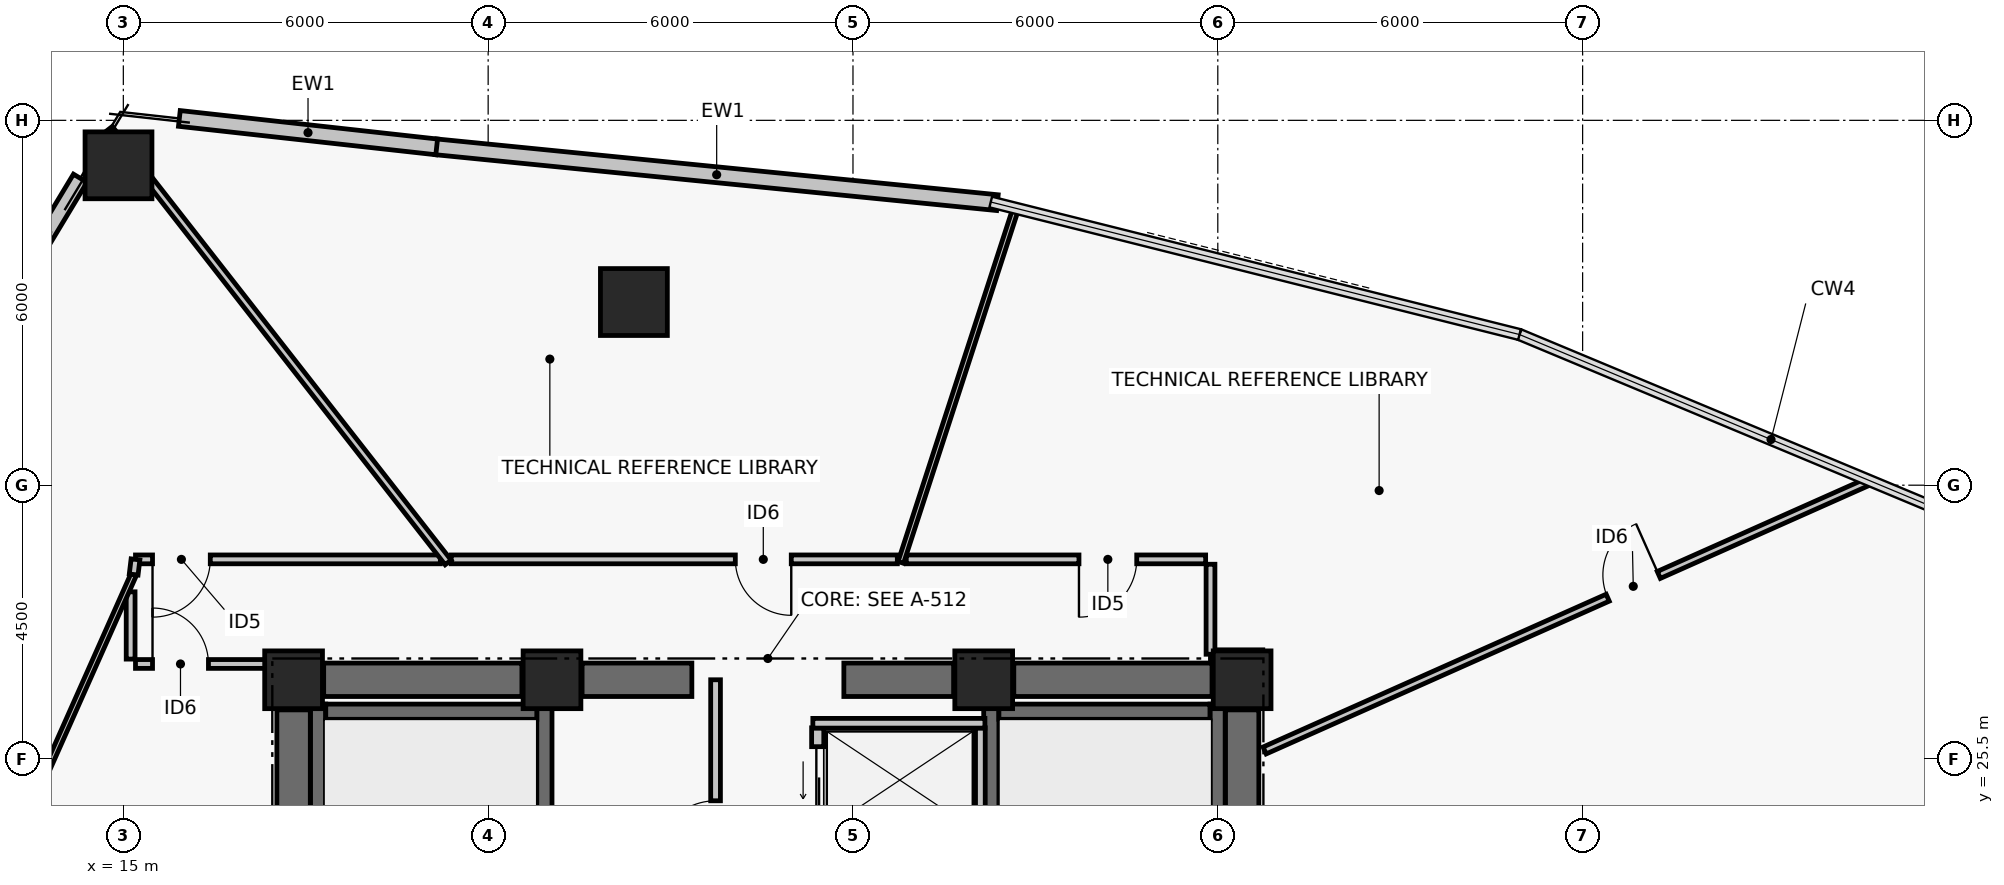
"""IFC4 building model, lengths in metres.
Left out: names, types, materials, properties, quantities, classifications, styles, units other than length and angle.
Written with IfcOpenShell. Run it as: python <this file> out.ifc"""

import sys

from ifc_helpers import new_model, si_unit, direction, frame, frame_2d, origin, origin_2d, place, context, subcontext, project, spatial, rectangle, hollow_rectangle, extrude, element, fill, save


model = new_model("IFC4")
c1 = context("Model", 3, precision=1e-05, world=origin(), true_north=direction((0.0, 1.0)))
c2 = subcontext(c1, "Body", "Model", "MODEL_VIEW")
j1 = project(units=[si_unit("LENGTHUNIT", "METRE"), si_unit("PLANEANGLEUNIT", "RADIAN")], contexts=[c1])
p1 = place(None, origin())
s1 = spatial("IfcSite", under=j1, at=p1, CompositionType="ELEMENT")
p2 = place(p1, origin())
s2 = spatial("IfcBuilding", under=s1, at=p2, CompositionType="ELEMENT")
p3 = place(p2, frame((0.0, 0.0, 158.04)))
s3 = spatial("IfcBuildingStorey", under=s2, at=p3, CompositionType="ELEMENT", Elevation=158.04)
for number, where, z_axis, x_axis in (
    (1, (17.8, 26.8, 0.0), (0.0, 0.0, 1.0), (1.0, 0.0, 0.0)),
    (2, (22.05, 26.8, 0.0), (0.0, 0.0, 1.0), (1.0, 0.0, 0.0)),
    (3, (29.15, 26.8, 0.0), (0.0, 0.0, 1.0), (1.0, 0.0, 0.0)),
    (4, (33.4, 26.8, 0.0), (0.0, 0.0, 1.0), (1.0, 0.0, 0.0)),
):
    element("IfcColumn", number, at=place(p3, frame(where, z_axis=z_axis, x_axis=x_axis)), inside=s3, PredefinedType="COLUMN", context=c2, shape_type="SweptSolid", body=[
        extrude(rectangle(XDim=0.95, YDim=0.95, at=origin_2d()), origin(), (0.0, 0.0, 1.0), 3.72),
    ])
p4 = place(p3, frame((18.295, 26.8, 0.0), z_axis=(0.0, 0.0, 1.0), x_axis=(1.0, 0.0, 0.0)))
e5 = element("IfcWall", 5, at=p4, inside=s3, PredefinedType="SHEAR", context=c2, shape_type="SweptSolid", body=[
    extrude(rectangle(XDim=3.26, YDim=0.55, at=frame_2d((1.63, 0.0))), origin(), (0.0, 0.0, 1.0), 3.5),
])
p5 = place(p3, frame((22.545, 26.8, 0.0), z_axis=(0.0, 0.0, 1.0), x_axis=(1.0, 0.0, 0.0)))
e6 = element("IfcWall", 6, at=p5, inside=s3, PredefinedType="SHEAR", context=c2, shape_type="SweptSolid", body=[
    extrude(rectangle(XDim=1.805, YDim=0.55, at=frame_2d((0.903, 0.0))), origin(), (0.0, 0.0, 1.0), 3.5),
])
p6 = place(p3, frame((26.85, 26.8, 0.0), z_axis=(0.0, 0.0, 1.0), x_axis=(1.0, 0.0, 0.0)))
e7 = element("IfcWall", 7, at=p6, inside=s3, PredefinedType="SHEAR", context=c2, shape_type="SweptSolid", body=[
    extrude(rectangle(XDim=1.805, YDim=0.55, at=frame_2d((0.902, 0.0))), origin(), (0.0, 0.0, 1.0), 3.5),
])
p7 = place(p3, frame((29.645, 26.8, 0.0), z_axis=(0.0, 0.0, 1.0), x_axis=(1.0, 0.0, 0.0)))
e8 = element("IfcWall", 8, at=p7, inside=s3, PredefinedType="SHEAR", context=c2, shape_type="SweptSolid", body=[
    extrude(rectangle(XDim=3.26, YDim=0.55, at=frame_2d((1.63, 0.0))), origin(), (0.0, 0.0, 1.0), 3.5),
])
for number, where, z_axis, x_axis in (
    (9, (17.8, 17.695, 0.0), (0.0, 0.0, 1.0), (0.0, 1.0, 0.0)),
    (10, (33.4, 17.695, 0.0), (0.0, 0.0, 1.0), (0.0, 1.0, 0.0)),
):
    element("IfcWall", number, at=place(p3, frame(where, z_axis=z_axis, x_axis=x_axis)), inside=s3, PredefinedType="SHEAR", context=c2, shape_type="SweptSolid", body=[
        extrude(rectangle(XDim=8.61, YDim=0.55, at=frame_2d((4.305, 0.0))), origin(), (0.0, 0.0, 1.0), 3.5),
    ])
p8 = place(p3, frame((18.204, 17.6, 0.0), z_axis=(0.0, 0.0, 1.0), x_axis=(0.0, 1.0, 0.0)))
e11 = element("IfcWall", 11, at=p8, inside=s3, PredefinedType="SHEAR", context=c2, shape_type="SweptSolid", body=[
    extrude(rectangle(XDim=8.8, YDim=0.25, at=frame_2d((4.4, 0.0))), origin(), (0.0, 0.0, 1.0), 3.5),
])
p9 = place(p3, frame((21.925, 17.6, 0.0), z_axis=(0.0, 0.0, 1.0), x_axis=(0.0, 1.0, 0.0)))
e12 = element("IfcWall", 12, at=p9, inside=s3, PredefinedType="SHEAR", context=c2, shape_type="SweptSolid", body=[
    extrude(rectangle(XDim=8.8, YDim=0.25, at=frame_2d((4.4, 0.0))), origin(), (0.0, 0.0, 1.0), 3.5),
])
p10 = place(p9, frame((0.35, 0.0, 0.0)))
e13 = element("IfcOpeningElement", 13, at=p10, cuts=e12, PredefinedType="OPENING", context=c2, shape_type="SweptSolid", body=[
    extrude(rectangle(XDim=1.05, YDim=2.08, at=frame_2d((0.525, 1.04))), frame((0.0, 0.135, 0.0), z_axis=(0.0, -1.0, 0.0), x_axis=(1.0, 0.0, 0.0)), (0.0, 0.0, 1.0), 0.27),
])
p11 = place(p3, frame((18.329, 26.275, 0.0), z_axis=(0.0, 0.0, 1.0), x_axis=(1.0, 0.0, 0.0)))
e14 = element("IfcWall", 14, at=p11, inside=s3, PredefinedType="SHEAR", context=c2, shape_type="SweptSolid", body=[
    extrude(rectangle(XDim=3.471, YDim=0.25, at=frame_2d((1.735, 0.0))), origin(), (0.0, 0.0, 1.0), 3.5),
])
p12 = place(p3, frame((29.275, 17.6, 0.0), z_axis=(0.0, 0.0, 1.0), x_axis=(0.0, 1.0, 0.0)))
e15 = element("IfcWall", 15, at=p12, inside=s3, PredefinedType="SHEAR", context=c2, shape_type="SweptSolid", body=[
    extrude(rectangle(XDim=8.8, YDim=0.25, at=frame_2d((4.4, 0.0))), origin(), (0.0, 0.0, 1.0), 3.5),
])
p13 = place(p12, frame((0.35, 0.0, 0.0)))
e16 = element("IfcOpeningElement", 16, at=p13, cuts=e15, PredefinedType="OPENING", context=c2, shape_type="SweptSolid", body=[
    extrude(rectangle(XDim=1.05, YDim=2.08, at=frame_2d((0.525, 1.04))), frame((0.0, 0.135, 0.0), z_axis=(0.0, -1.0, 0.0), x_axis=(1.0, 0.0, 0.0)), (0.0, 0.0, 1.0), 0.27),
])
p14 = place(p3, frame((32.996, 17.6, 0.0), z_axis=(0.0, 0.0, 1.0), x_axis=(0.0, 1.0, 0.0)))
e17 = element("IfcWall", 17, at=p14, inside=s3, PredefinedType="SHEAR", context=c2, shape_type="SweptSolid", body=[
    extrude(rectangle(XDim=8.8, YDim=0.25, at=frame_2d((4.4, 0.0))), origin(), (0.0, 0.0, 1.0), 3.5),
])
p15 = place(p3, frame((29.4, 26.275, 0.0), z_axis=(0.0, 0.0, 1.0), x_axis=(1.0, 0.0, 0.0)))
e18 = element("IfcWall", 18, at=p15, inside=s3, PredefinedType="SHEAR", context=c2, shape_type="SweptSolid", body=[
    extrude(rectangle(XDim=3.471, YDim=0.25, at=frame_2d((1.736, 0.0))), origin(), (0.0, 0.0, 1.0), 3.5),
])
for number, where, z_axis, x_axis in (
    (19, (23.397, 33.012, 0.0), (0.0, 0.0, 1.0), (1.0, 0.0, 0.0)),
    (20, (14.92, 35.26, 0.0), (0.0, 0.0, 1.0), (1.0, 0.0, 0.0)),
):
    element("IfcColumn", number, at=place(p3, frame(where, z_axis=z_axis, x_axis=x_axis)), inside=s3, PredefinedType="COLUMN", context=c2, shape_type="SweptSolid", body=[
        extrude(hollow_rectangle(XDim=1.1, YDim=1.1, WallThickness=0.045, at=origin_2d()), origin(), (0.0, 0.0, 1.0), 3.72),
    ])
p16 = place(p3, frame((20.141, 35.565, 0.0), z_axis=(0.0, 0.0, 1.0), x_axis=(0.9950896707, -0.098977508888, 0.0)))
e21 = element("IfcWall", 21, at=p16, inside=s3, PredefinedType="PARTITIONING", context=c2, shape_type="SweptSolid", body=[
    extrude(rectangle(XDim=9.28, YDim=0.26, at=frame_2d((4.64, 0.0))), origin(), (0.0, 0.0, 1.0), 3.5),
])
p17 = place(p3, frame((15.921, 36.031, 0.0), z_axis=(0.0, 0.0, 1.0), x_axis=(0.993933978819, -0.109978387641, 0.0)))
e22 = element("IfcWall", 22, at=p17, inside=s3, PredefinedType="PARTITIONING", context=c2, shape_type="SweptSolid", body=[
    extrude(rectangle(XDim=4.258, YDim=0.26, at=frame_2d((2.129, 0.0))), origin(), (0.0, 0.0, 1.0), 3.5),
])
p18 = place(p3, frame((13.221, 33.272, 0.0), z_axis=(0.0, 0.0, 1.0), x_axis=(0.516157331647, 0.856493788061, 0.0)))
e23 = element("IfcWall", 23, at=p18, inside=s3, PredefinedType="PARTITIONING", context=c2, shape_type="SweptSolid", body=[
    extrude(rectangle(XDim=2.073, YDim=0.26, at=frame_2d((1.037, 0.0))), origin(), (0.0, 0.0, 1.0), 3.5),
])
p19 = place(p3, frame((26.42, 24.29, 0.0), z_axis=(0.0, 0.0, 1.0), x_axis=(0.0, 1.0, 0.0)))
e24 = element("IfcWall", 24, at=p19, inside=s3, PredefinedType="PARTITIONING", context=c2, shape_type="SweptSolid", body=[
    extrude(rectangle(XDim=1.72, YDim=0.2, at=frame_2d((0.86, 0.0))), origin(), (0.0, 0.0, 1.0), 3.5),
])
p20 = place(p19, frame((0.31, 0.0, 0.0)))
e25 = element("IfcOpeningElement", 25, at=p20, cuts=e24, PredefinedType="OPENING", context=c2, shape_type="SweptSolid", body=[
    extrude(rectangle(XDim=1.1, YDim=2.08, at=frame_2d((0.55, 1.04))), frame((0.0, 0.11, 0.0), z_axis=(0.0, -1.0, 0.0), x_axis=(1.0, 0.0, 0.0)), (0.0, 0.0, 1.0), 0.22),
])
p21 = place(p3, frame((29.095, 20.56, 0.0), z_axis=(0.0, 0.0, 1.0), x_axis=(0.0, 1.0, 0.0)))
e26 = element("IfcWall", 26, at=p21, inside=s3, PredefinedType="PARTITIONING", context=c2, shape_type="SweptSolid", body=[
    extrude(rectangle(XDim=5.45, YDim=0.16, at=frame_2d((2.725, 0.0))), origin(), (0.0, 0.0, 1.0), 3.5),
])
p22 = place(p3, frame((26.34, 26.085, 0.0), z_axis=(0.0, 0.0, 1.0), x_axis=(1.0, 0.0, 0.0)))
e27 = element("IfcWall", 27, at=p22, inside=s3, PredefinedType="PARTITIONING", context=c2, shape_type="SweptSolid", body=[
    extrude(rectangle(XDim=2.83, YDim=0.16, at=frame_2d((1.415, 0.0))), origin(), (0.0, 0.0, 1.0), 3.5),
])
p23 = place(p3, frame((24.74, 22.43, 0.0), z_axis=(0.0, 0.0, 1.0), x_axis=(0.0, 1.0, 0.0)))
e28 = element("IfcWall", 28, at=p23, inside=s3, PredefinedType="PARTITIONING", context=c2, shape_type="SweptSolid", body=[
    extrude(rectangle(XDim=4.37, YDim=0.16, at=frame_2d((2.185, 0.0))), origin(), (0.0, 0.0, 1.0), 2.63),
])
p24 = place(p23, frame((1.4, 0.0, 0.0)))
e29 = element("IfcOpeningElement", 29, at=p24, cuts=e28, PredefinedType="OPENING", context=c2, shape_type="SweptSolid", body=[
    extrude(rectangle(XDim=0.98, YDim=2.06, at=frame_2d((0.49, 1.03))), frame((0.0, 0.09, 0.0), z_axis=(0.0, -1.0, 0.0), x_axis=(1.0, 0.0, 0.0)), (0.0, 0.0, 1.0), 0.18),
])
p25 = place(p3, frame((33.74, 27.22, 0.0), z_axis=(0.0, 0.0, 1.0), x_axis=(-1.0, 0.0, 0.0)))
e30 = element("IfcWall", 30, at=p25, inside=s3, PredefinedType="PARTITIONING", context=c2, shape_type="SweptSolid", body=[
    extrude(rectangle(XDim=0.86, YDim=0.145, at=frame_2d((0.43, 0.0))), origin(), (0.0, 0.0, 1.0), 2.63),
])
p26 = place(p3, frame((32.88, 27.22, 0.0), z_axis=(0.0, 0.0, 1.0), x_axis=(0.0, 1.0, 0.0)))
e31 = element("IfcWall", 31, at=p26, inside=s3, PredefinedType="PARTITIONING", context=c2, shape_type="SweptSolid", body=[
    extrude(rectangle(XDim=1.48, YDim=0.145, at=frame_2d((0.74, 0.0))), origin(), (0.0, 0.0, 1.0), 2.63),
])
p27 = place(p3, frame((32.8, 28.78, 0.0), z_axis=(0.0, 0.0, 1.0), x_axis=(-1.0, 0.0, 0.0)))
e32 = element("IfcWall", 32, at=p27, inside=s3, PredefinedType="PARTITIONING", context=c2, shape_type="SweptSolid", body=[
    extrude(rectangle(XDim=4.923, YDim=0.145, at=frame_2d((2.462, 0.0))), origin(), (0.0, 0.0, 1.0), 2.93),
])
p28 = place(p27, frame((1.133, 0.0, 0.0)))
e33 = element("IfcOpeningElement", 33, at=p28, cuts=e32, PredefinedType="OPENING", context=c2, shape_type="SweptSolid", body=[
    extrude(rectangle(XDim=0.95, YDim=2.06, at=frame_2d((0.475, 1.03))), frame((0.0, 0.083, 0.0), z_axis=(0.0, -1.0, 0.0), x_axis=(1.0, 0.0, 0.0)), (0.0, 0.0, 1.0), 0.165),
])
p29 = place(p3, frame((27.729, 28.78, 0.0), z_axis=(0.0, 0.0, 1.0), x_axis=(-1.0, 0.0, 0.0)))
e34 = element("IfcWall", 34, at=p29, inside=s3, PredefinedType="PARTITIONING", context=c2, shape_type="SweptSolid", body=[
    extrude(rectangle(XDim=7.338, YDim=0.145, at=frame_2d((3.669, 0.0))), origin(), (0.0, 0.0, 1.0), 2.73),
])
p30 = place(p29, frame((1.744, 0.0, 0.0)))
e35 = element("IfcOpeningElement", 35, at=p30, cuts=e34, PredefinedType="OPENING", context=c2, shape_type="SweptSolid", body=[
    extrude(rectangle(XDim=0.92, YDim=2.05, at=frame_2d((0.46, 1.025))), frame((0.0, 0.083, 0.0), z_axis=(0.0, -1.0, 0.0), x_axis=(1.0, 0.0, 0.0)), (0.0, 0.0, 1.0), 0.165),
])
p31 = place(p3, frame((20.214, 28.78, 0.0), z_axis=(0.0, 0.0, 1.0), x_axis=(-1.0, 0.0, 0.0)))
e36 = element("IfcWall", 36, at=p31, inside=s3, PredefinedType="PARTITIONING", context=c2, shape_type="SweptSolid", body=[
    extrude(rectangle(XDim=5.014, YDim=0.145, at=frame_2d((2.507, 0.0))), origin(), (0.0, 0.0, 1.0), 2.73),
])
p32 = place(p31, frame((3.784, 0.0, 0.0)))
e37 = element("IfcOpeningElement", 37, at=p32, cuts=e36, PredefinedType="OPENING", context=c2, shape_type="SweptSolid", body=[
    extrude(rectangle(XDim=0.95, YDim=2.06, at=frame_2d((0.475, 1.03))), frame((0.0, 0.083, 0.0), z_axis=(0.0, -1.0, 0.0), x_axis=(1.0, 0.0, 0.0)), (0.0, 0.0, 1.0), 0.165),
])
p33 = place(p3, frame((15.2, 27.06, 0.0), z_axis=(0.0, 0.0, 1.0), x_axis=(1.0, 0.0, 0.0)))
e38 = element("IfcWall", 38, at=p33, inside=s3, PredefinedType="PARTITIONING", context=c2, shape_type="SweptSolid", body=[
    extrude(rectangle(XDim=2.18, YDim=0.145, at=frame_2d((1.09, 0.0))), origin(), (0.0, 0.0, 1.0), 2.73),
])
p34 = place(p33, frame((0.28, 0.0, 0.0)))
e39 = element("IfcOpeningElement", 39, at=p34, cuts=e38, PredefinedType="OPENING", context=c2, shape_type="SweptSolid", body=[
    extrude(rectangle(XDim=0.92, YDim=2.05, at=frame_2d((0.46, 1.025))), frame((0.0, 0.083, 0.0), z_axis=(0.0, -1.0, 0.0), x_axis=(1.0, 0.0, 0.0)), (0.0, 0.0, 1.0), 0.165),
])
p35 = place(p3, frame((15.12, 28.247, 0.0), z_axis=(0.0, 0.0, 1.0), x_axis=(0.0, -1.0, 0.0)))
e40 = element("IfcWall", 40, at=p35, inside=s3, PredefinedType="PARTITIONING", context=c2, shape_type="SweptSolid", body=[
    extrude(rectangle(XDim=1.107, YDim=0.145, at=frame_2d((0.553, 0.0))), origin(), (0.0, 0.0, 1.0), 2.73),
])
p36 = place(p3, frame((33.77, 25.637, 0.0), z_axis=(0.0, 0.0, 1.0), x_axis=(0.913542006179, 0.406744395102, 0.0)))
e41 = element("IfcWall", 41, at=p36, inside=s3, PredefinedType="PARTITIONING", context=c2, shape_type="SweptSolid", body=[
    extrude(rectangle(XDim=10.915, YDim=0.125, at=frame_2d((5.457, 0.0))), origin(), (0.0, 0.0, 1.0), 2.63),
])
p37 = place(p36, frame((6.177, 0.0, 0.0)))
e42 = element("IfcOpeningElement", 42, at=p37, cuts=e41, PredefinedType="OPENING", context=c2, shape_type="SweptSolid", body=[
    extrude(rectangle(XDim=0.92, YDim=2.05, at=frame_2d((0.46, 1.025))), frame((0.0, 0.073, 0.0), z_axis=(0.0, -1.0, 0.0), x_axis=(1.0, 0.0, 0.0)), (0.0, 0.0, 1.0), 0.145),
])
p38 = place(p3, frame((27.787, 28.73, 0.0), z_axis=(0.0, 0.0, 1.0), x_axis=(0.309017664707, 0.951056298491, 0.0)))
e43 = element("IfcWall", 43, at=p38, inside=s3, PredefinedType="PARTITIONING", context=c2, shape_type="SweptSolid", body=[
    extrude(rectangle(XDim=6.133, YDim=0.095, at=frame_2d((3.067, 0.0))), origin(), (0.0, 0.0, 1.0), 2.93),
])
p39 = place(p3, frame((20.342, 28.73, 0.0), z_axis=(0.0, 0.0, 1.0), x_axis=(-0.615659223334, 0.78801251305, 0.0)))
e44 = element("IfcWall", 44, at=p39, inside=s3, PredefinedType="PARTITIONING", context=c2, shape_type="SweptSolid", body=[
    extrude(rectangle(XDim=9.05, YDim=0.125, at=frame_2d((4.525, 0.0))), origin(), (0.0, 0.0, 1.0), 2.93),
])
p40 = place(p3, frame((15.17, 28.531, 0.0), z_axis=(0.0, 0.0, 1.0), x_axis=(-0.406717829794, -0.913553833623, 0.0)))
e45 = element("IfcWall", 45, at=p40, inside=s3, PredefinedType="PARTITIONING", context=c2, shape_type="SweptSolid", body=[
    extrude(rectangle(XDim=8.718, YDim=0.095, at=frame_2d((4.359, 0.0))), origin(), (0.0, 0.0, 1.0), 2.73),
])
p41 = place(p3, frame((15.2, 28.78, 0.0), z_axis=(0.0, 0.0, 1.0), x_axis=(-0.119720914767, -0.992807585873, 0.0)))
e46 = element("IfcWall", 46, at=p41, inside=s3, PredefinedType="PARTITIONING", context=c2, shape_type="SweptSolid", body=[
    extrude(rectangle(XDim=0.251, YDim=0.145, at=frame_2d((0.125, 0.0))), origin(), (0.0, 0.0, 1.0), 3.5),
])
p42 = place(p20, origin())
e47 = element("IfcDoor", 47, at=p42, inside=s3, OperationType="DOUBLE_DOOR_SLIDING", PredefinedType="DOOR", context=c2, shape_type="SweptSolid", body=[
    extrude(rectangle(XDim=1.1, YDim=2.08, at=frame_2d((0.55, 1.04))), frame((0.0, 0.025, 0.0), z_axis=(0.0, -1.0, 0.0), x_axis=(1.0, 0.0, 0.0)), (0.0, 0.0, 1.0), 0.05),
])
fill(e25, e47)
p43 = place(p24, origin())
e48 = element("IfcDoor", 48, at=p43, inside=s3, OperationType="SINGLE_SWING_LEFT", PredefinedType="DOOR", context=c2, shape_type="SweptSolid", body=[
    extrude(rectangle(XDim=0.98, YDim=2.06, at=frame_2d((0.49, 1.03))), frame((0.0, 0.025, 0.0), z_axis=(0.0, -1.0, 0.0), x_axis=(1.0, 0.0, 0.0)), (0.0, 0.0, 1.0), 0.05),
])
fill(e29, e48)
p44 = place(p28, origin())
e49 = element("IfcDoor", 49, at=p44, inside=s3, OperationType="SINGLE_SWING_RIGHT", PredefinedType="DOOR", context=c2, shape_type="SweptSolid", body=[
    extrude(rectangle(XDim=0.95, YDim=2.06, at=frame_2d((0.475, 1.03))), frame((0.0, 0.025, 0.0), z_axis=(0.0, -1.0, 0.0), x_axis=(1.0, 0.0, 0.0)), (0.0, 0.0, 1.0), 0.05),
])
fill(e33, e49)
p45 = place(p30, origin())
e50 = element("IfcDoor", 50, at=p45, inside=s3, OperationType="SINGLE_SWING_LEFT", PredefinedType="DOOR", context=c2, shape_type="SweptSolid", body=[
    extrude(rectangle(XDim=0.92, YDim=2.05, at=frame_2d((0.46, 1.025))), frame((0.0, 0.025, 0.0), z_axis=(0.0, -1.0, 0.0), x_axis=(1.0, 0.0, 0.0)), (0.0, 0.0, 1.0), 0.05),
])
fill(e35, e50)
p46 = place(p32, origin())
e51 = element("IfcDoor", 51, at=p46, inside=s3, OperationType="SINGLE_SWING_RIGHT", PredefinedType="DOOR", context=c2, shape_type="SweptSolid", body=[
    extrude(rectangle(XDim=0.95, YDim=2.06, at=frame_2d((0.475, 1.03))), frame((0.0, 0.025, 0.0), z_axis=(0.0, -1.0, 0.0), x_axis=(1.0, 0.0, 0.0)), (0.0, 0.0, 1.0), 0.05),
])
fill(e37, e51)
p47 = place(p34, origin())
e52 = element("IfcDoor", 52, at=p47, inside=s3, OperationType="SINGLE_SWING_LEFT", PredefinedType="DOOR", context=c2, shape_type="SweptSolid", body=[
    extrude(rectangle(XDim=0.92, YDim=2.05, at=frame_2d((0.46, 1.025))), frame((0.0, 0.025, 0.0), z_axis=(0.0, -1.0, 0.0), x_axis=(1.0, 0.0, 0.0)), (0.0, 0.0, 1.0), 0.05),
])
fill(e39, e52)
p48 = place(p37, origin())
e53 = element("IfcDoor", 53, at=p48, inside=s3, OperationType="SINGLE_SWING_RIGHT", PredefinedType="DOOR", context=c2, shape_type="SweptSolid", body=[
    extrude(rectangle(XDim=0.92, YDim=2.05, at=frame_2d((0.46, 1.025))), frame((0.0, 0.025, 0.0), z_axis=(0.0, -1.0, 0.0), x_axis=(1.0, 0.0, 0.0)), (0.0, 0.0, 1.0), 0.05),
])
fill(e42, e53)
save(model, sys.argv[1])
